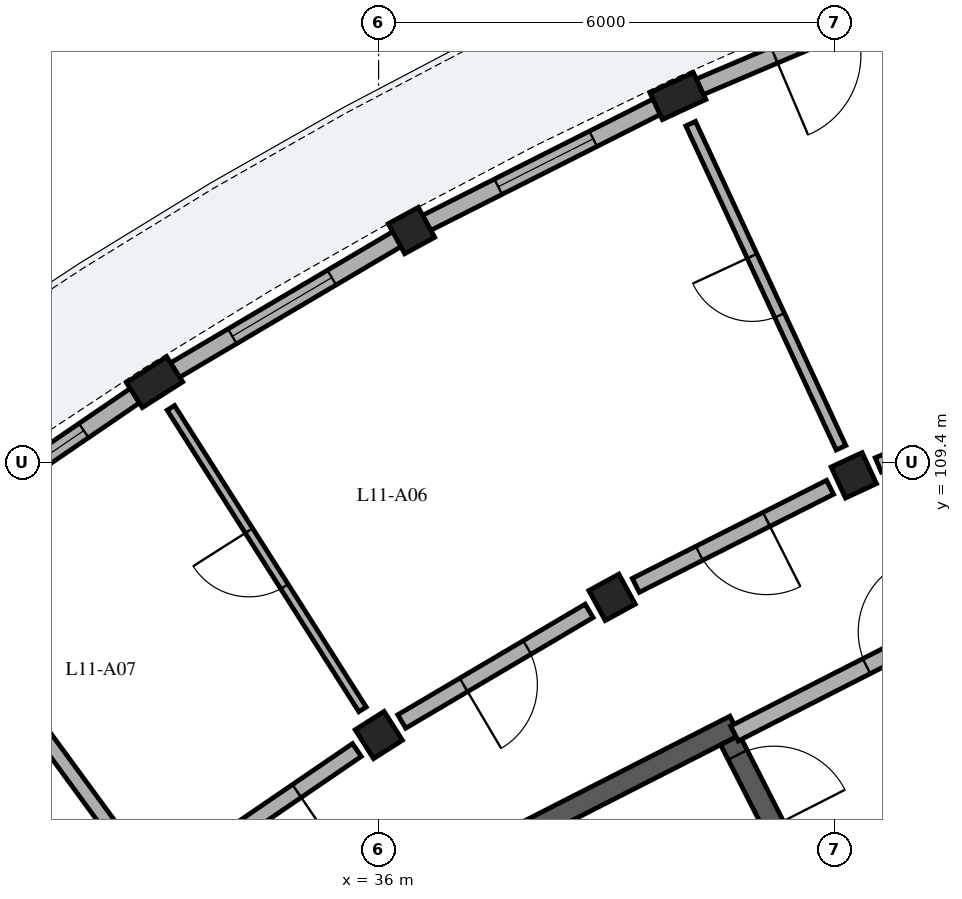
"""IFC4 building model, lengths in metres.
Left out: names, types, materials, properties, quantities, classifications, styles, units other than length and angle.
Written with IfcOpenShell. Run it as: python <this file> out.ifc"""

import sys

from ifc_helpers import new_model, si_unit, direction, frame, frame_2d, origin, origin_2d, place, context, subcontext, project, spatial, rectangle, extrude, element, fill, save


model = new_model("IFC4")
c1 = context("Model", 3, precision=1e-05, world=origin(), true_north=direction((0.0, 1.0)))
c2 = subcontext(c1, "Body", "Model", "MODEL_VIEW")
j1 = project(units=[si_unit("LENGTHUNIT", "METRE"), si_unit("PLANEANGLEUNIT", "RADIAN")], contexts=[c1])
p1 = place(None, origin())
s1 = spatial("IfcSite", under=j1, at=p1, CompositionType="ELEMENT")
p2 = place(p1, origin())
s2 = spatial("IfcBuilding", under=s1, at=p2, CompositionType="ELEMENT")
p3 = place(p2, frame((0.0, 0.0, 39.08)))
s3 = spatial("IfcBuildingStorey", under=s2, at=p3, CompositionType="ELEMENT", Elevation=39.08)
p4 = place(p3, frame((37.585, 104.357, 0.0), z_axis=(0.0, 0.0, 1.0), x_axis=(0.891020222667, 0.453963613958, 0.0)))
e1 = element("IfcWall", 1, at=p4, inside=s3, PredefinedType="SHEAR", context=c2, shape_type="SweptSolid", body=[
    extrude(rectangle(XDim=3.48, YDim=0.28, at=frame_2d((1.74, 0.0))), origin(), (0.0, 0.0, 1.0), 3.11),
])
p5 = place(p3, frame((40.625, 105.748, 0.0), z_axis=(0.0, 0.0, 1.0), x_axis=(0.453992276384, -0.891005618941, 0.0)))
e2 = element("IfcWall", 2, at=p5, inside=s3, PredefinedType="SHEAR", context=c2, shape_type="SweptSolid", body=[
    extrude(rectangle(XDim=6.6, YDim=0.28, at=frame_2d((3.3, 0.0))), origin(), (0.0, 0.0, 1.0), 3.11),
])
p6 = place(p5, frame((0.22, 0.0, 0.0)))
e3 = element("IfcOpeningElement", 3, at=p6, cuts=e2, PredefinedType="OPENING", context=c2, shape_type="SweptSolid", body=[
    extrude(rectangle(XDim=1.05, YDim=2.15, at=frame_2d((0.525, 1.075))), frame((0.0, 0.15, 0.0), z_axis=(0.0, -1.0, 0.0), x_axis=(1.0, 0.0, 0.0)), (0.0, 0.0, 1.0), 0.3),
])
p7 = place(p3, frame((42.252, 109.23, 0.0), z_axis=(0.0, 0.0, 1.0), x_axis=(-0.420859924104, 0.907125638643, 0.0)))
e4 = element("IfcColumn", 4, at=p7, inside=s3, PredefinedType="COLUMN", context=c2, shape_type="SweptSolid", body=[
    extrude(rectangle(XDim=0.45, YDim=0.45, at=origin_2d()), origin(), (0.0, 0.0, 1.0), 3.12),
])
p8 = place(p3, frame((39.938, 114.219, 0.0), z_axis=(0.0, 0.0, 1.0), x_axis=(-0.420859924104, 0.907125638643, 0.0)))
e5 = element("IfcColumn", 5, at=p8, inside=s3, PredefinedType="PILASTER", context=c2, shape_type="SweptSolid", body=[
    extrude(rectangle(XDim=0.39, YDim=0.63, at=origin_2d()), origin(), (0.0, 0.0, 1.0), 3.12),
])
for number, where, z_axis, x_axis in (
    (6, (39.072, 107.625, 0.0), (0.0, 0.0, 1.0), (-0.48, 0.877, 0.0)),
    (7, (36.433, 112.451, 0.0), (0.0, 0.0, 1.0), (-0.48, 0.877, 0.0)),
    (8, (36.003, 105.813, 0.0), (0.0, 0.0, 1.0), (-0.536, 0.844, 0.0)),
):
    element("IfcColumn", number, at=place(p3, frame(where, z_axis=z_axis, x_axis=x_axis)), inside=s3, PredefinedType="COLUMN", context=c2, shape_type="SweptSolid", body=[
        extrude(rectangle(XDim=0.45, YDim=0.45, at=origin_2d()), origin(), (0.0, 0.0, 1.0), 3.12),
    ])
p9 = place(p3, frame((33.052, 110.455, 0.0), z_axis=(0.0, 0.0, 1.0), x_axis=(-0.536481603385, 0.843912015099, 0.0)))
e9 = element("IfcColumn", 9, at=p9, inside=s3, PredefinedType="PILASTER", context=c2, shape_type="SweptSolid", body=[
    extrude(rectangle(XDim=0.39, YDim=0.63, at=origin_2d()), origin(), (0.0, 0.0, 1.0), 3.12),
])
p10 = place(p3, frame((43.372, 115.677, 0.0), z_axis=(0.0, 0.0, 1.0), x_axis=(-0.920495973723, -0.390752047161, 0.0)))
e10 = element("IfcWall", 10, at=p10, inside=s3, PredefinedType="SOLIDWALL", context=c2, shape_type="SweptSolid", body=[
    extrude(rectangle(XDim=3.566, YDim=0.225, at=frame_2d((1.783, 0.0))), origin(), (0.0, 0.0, 1.0), 2.355),
])
p11 = place(p10, frame((1.213, 0.0, 0.0)))
e11 = element("IfcOpeningElement", 11, at=p11, cuts=e10, PredefinedType="OPENING", context=c2, shape_type="SweptSolid", body=[
    extrude(rectangle(XDim=1.14, YDim=2.16, at=frame_2d((0.57, 1.08))), frame((0.0, 0.123, 0.0), z_axis=(0.0, -1.0, 0.0), x_axis=(1.0, 0.0, 0.0)), (0.0, 0.0, 1.0), 0.245),
])
p12 = place(p3, frame((39.791, 114.145, 0.0), z_axis=(0.0, 0.0, 1.0), x_axis=(-0.892764108044, -0.450524413753, 0.0)))
e12 = element("IfcWall", 12, at=p12, inside=s3, PredefinedType="SOLIDWALL", context=c2, shape_type="SweptSolid", body=[
    extrude(rectangle(XDim=3.566, YDim=0.225, at=frame_2d((1.783, 0.0))), origin(), (0.0, 0.0, 1.0), 2.355),
])
p13 = place(p12, frame((1.083, 0.0, 0.55)))
e13 = element("IfcOpeningElement", 13, at=p13, cuts=e12, PredefinedType="OPENING", context=c2, shape_type="SweptSolid", body=[
    extrude(rectangle(XDim=1.4, YDim=1.635, at=frame_2d((0.7, 0.817))), frame((0.0, 0.123, 0.0), z_axis=(0.0, -1.0, 0.0), x_axis=(1.0, 0.0, 0.0)), (0.0, 0.0, 1.0), 0.245),
])
p14 = place(p3, frame((36.265, 112.352, 0.0), z_axis=(0.0, 0.0, 1.0), x_axis=(-0.861132283606, -0.508380949811, 0.0)))
e14 = element("IfcWall", 14, at=p14, inside=s3, PredefinedType="SOLIDWALL", context=c2, shape_type="SweptSolid", body=[
    extrude(rectangle(XDim=3.566, YDim=0.225, at=frame_2d((1.783, 0.0))), origin(), (0.0, 0.0, 1.0), 2.355),
])
p15 = place(p14, frame((1.023, 0.0, 0.55)))
e15 = element("IfcOpeningElement", 15, at=p15, cuts=e14, PredefinedType="OPENING", context=c2, shape_type="SweptSolid", body=[
    extrude(rectangle(XDim=1.52, YDim=1.485, at=frame_2d((0.76, 0.743))), frame((0.0, 0.123, 0.0), z_axis=(0.0, -1.0, 0.0), x_axis=(1.0, 0.0, 0.0)), (0.0, 0.0, 1.0), 0.245),
])
p16 = place(p3, frame((32.916, 110.362, 0.0), z_axis=(0.0, 0.0, 1.0), x_axis=(-0.825772203118, -0.564003784169, 0.0)))
e16 = element("IfcWall", 16, at=p16, inside=s3, PredefinedType="SOLIDWALL", context=c2, shape_type="SweptSolid", body=[
    extrude(rectangle(XDim=3.566, YDim=0.225, at=frame_2d((1.783, 0.0))), origin(), (0.0, 0.0, 1.0), 2.355),
])
p17 = place(p16, frame((0.963, 0.0, 0.55)))
e17 = element("IfcOpeningElement", 17, at=p17, cuts=e16, PredefinedType="OPENING", context=c2, shape_type="SweptSolid", body=[
    extrude(rectangle(XDim=1.64, YDim=1.56, at=frame_2d((0.82, 0.78))), frame((0.0, 0.123, 0.0), z_axis=(0.0, -1.0, 0.0), x_axis=(1.0, 0.0, 0.0)), (0.0, 0.0, 1.0), 0.245),
])
p18 = place(p3, frame((40.682, 105.834, 0.0), z_axis=(0.0, 0.0, 1.0), x_axis=(0.891003372311, 0.453996685595, 0.0)))
e18 = element("IfcWall", 18, at=p18, inside=s3, PredefinedType="PARTITIONING", context=c2, shape_type="SweptSolid", body=[
    extrude(rectangle(XDim=4.9, YDim=0.22, at=frame_2d((2.45, 0.0))), origin(), (0.0, 0.0, 1.0), 2.34),
])
p19 = place(p18, frame((1.95, 0.0, 0.0)))
e19 = element("IfcOpeningElement", 19, at=p19, cuts=e18, PredefinedType="OPENING", context=c2, shape_type="SweptSolid", body=[
    extrude(rectangle(XDim=1.0, YDim=2.15, at=frame_2d((0.5, 1.075))), frame((0.0, 0.12, 0.0), z_axis=(0.0, -1.0, 0.0), x_axis=(1.0, 0.0, 0.0)), (0.0, 0.0, 1.0), 0.24),
])
p20 = place(p3, frame((45.21, 110.486, 0.0), z_axis=(0.0, 0.0, 1.0), x_axis=(-0.920511160294, -0.390716270168, 0.0)))
e20 = element("IfcWall", 20, at=p20, inside=s3, PredefinedType="PARTITIONING", context=c2, shape_type="SweptSolid", body=[
    extrude(rectangle(XDim=2.863, YDim=0.205, at=frame_2d((1.432, 0.0))), origin(), (0.0, 0.0, 1.0), 2.37),
])
p21 = place(p20, frame((0.967, 0.0, 0.0)))
e21 = element("IfcOpeningElement", 21, at=p21, cuts=e20, PredefinedType="OPENING", context=c2, shape_type="SweptSolid", body=[
    extrude(rectangle(XDim=0.93, YDim=2.12, at=frame_2d((0.465, 1.06))), frame((0.0, 0.113, 0.0), z_axis=(0.0, -1.0, 0.0), x_axis=(1.0, 0.0, 0.0)), (0.0, 0.0, 1.0), 0.225),
])
p22 = place(p3, frame((42.084, 109.593, 0.0), z_axis=(0.0, 0.0, 1.0), x_axis=(-0.420862519045, 0.907124434718, 0.0)))
e22 = element("IfcWall", 22, at=p22, inside=s3, PredefinedType="PLUMBINGWALL", context=c2, shape_type="SweptSolid", body=[
    extrude(rectangle(XDim=4.7, YDim=0.14, at=frame_2d((2.35, 0.0))), origin(), (0.0, 0.0, 1.0), 2.37),
])
p23 = place(p22, frame((1.92, 0.0, 0.0)))
e23 = element("IfcOpeningElement", 23, at=p23, cuts=e22, PredefinedType="OPENING", context=c2, shape_type="SweptSolid", body=[
    extrude(rectangle(XDim=0.86, YDim=2.06, at=frame_2d((0.43, 1.03))), frame((0.0, 0.08, 0.0), z_axis=(0.0, -1.0, 0.0), x_axis=(1.0, 0.0, 0.0)), (0.0, 0.0, 1.0), 0.16),
])
p24 = place(p3, frame((41.94, 109.073, 0.0), z_axis=(0.0, 0.0, 1.0), x_axis=(-0.89273239336, -0.450587254419, 0.0)))
e24 = element("IfcWall", 24, at=p24, inside=s3, PredefinedType="PARTITIONING", context=c2, shape_type="SweptSolid", body=[
    extrude(rectangle(XDim=2.863, YDim=0.205, at=frame_2d((1.432, 0.0))), origin(), (0.0, 0.0, 1.0), 2.37),
])
p25 = place(p24, frame((0.937, 0.0, 0.0)))
e25 = element("IfcOpeningElement", 25, at=p25, cuts=e24, PredefinedType="OPENING", context=c2, shape_type="SweptSolid", body=[
    extrude(rectangle(XDim=0.99, YDim=2.16, at=frame_2d((0.495, 1.08))), frame((0.0, 0.113, 0.0), z_axis=(0.0, -1.0, 0.0), x_axis=(1.0, 0.0, 0.0)), (0.0, 0.0, 1.0), 0.225),
])
p26 = place(p3, frame((38.77, 107.447, 0.0), z_axis=(0.0, 0.0, 1.0), x_axis=(-0.861113214678, -0.508413248753, 0.0)))
e26 = element("IfcWall", 26, at=p26, inside=s3, PredefinedType="PARTITIONING", context=c2, shape_type="SweptSolid", body=[
    extrude(rectangle(XDim=2.863, YDim=0.205, at=frame_2d((1.432, 0.0))), origin(), (0.0, 0.0, 1.0), 2.37),
])
p27 = place(p26, frame((0.947, 0.0, 0.0)))
e27 = element("IfcOpeningElement", 27, at=p27, cuts=e26, PredefinedType="OPENING", context=c2, shape_type="SweptSolid", body=[
    extrude(rectangle(XDim=0.97, YDim=2.15, at=frame_2d((0.485, 1.075))), frame((0.0, 0.113, 0.0), z_axis=(0.0, -1.0, 0.0), x_axis=(1.0, 0.0, 0.0)), (0.0, 0.0, 1.0), 0.225),
])
p28 = place(p3, frame((35.789, 106.151, 0.0), z_axis=(0.0, 0.0, 1.0), x_axis=(-0.536492262982, 0.843905238614, 0.0)))
e28 = element("IfcWall", 28, at=p28, inside=s3, PredefinedType="PARTITIONING", context=c2, shape_type="SweptSolid", body=[
    extrude(rectangle(XDim=4.7, YDim=0.115, at=frame_2d((2.35, 0.0))), origin(), (0.0, 0.0, 1.0), 2.37),
])
p29 = place(p28, frame((1.915, 0.0, 0.0)))
e29 = element("IfcOpeningElement", 29, at=p29, cuts=e28, PredefinedType="OPENING", context=c2, shape_type="SweptSolid", body=[
    extrude(rectangle(XDim=0.87, YDim=2.08, at=frame_2d((0.435, 1.04))), frame((0.0, 0.067, 0.0), z_axis=(0.0, -1.0, 0.0), x_axis=(1.0, 0.0, 0.0)), (0.0, 0.0, 1.0), 0.135),
])
p30 = place(p3, frame((35.714, 105.616, 0.0), z_axis=(0.0, 0.0, 1.0), x_axis=(-0.825779671787, -0.563992848947, 0.0)))
e30 = element("IfcWall", 30, at=p30, inside=s3, PredefinedType="PARTITIONING", context=c2, shape_type="SweptSolid", body=[
    extrude(rectangle(XDim=2.863, YDim=0.205, at=frame_2d((1.432, 0.0))), origin(), (0.0, 0.0, 1.0), 2.37),
])
p31 = place(p30, frame((0.957, 0.0, 0.0)))
e31 = element("IfcOpeningElement", 31, at=p31, cuts=e30, PredefinedType="OPENING", context=c2, shape_type="SweptSolid", body=[
    extrude(rectangle(XDim=0.95, YDim=2.13, at=frame_2d((0.475, 1.065))), frame((0.0, 0.113, 0.0), z_axis=(0.0, -1.0, 0.0), x_axis=(1.0, 0.0, 0.0)), (0.0, 0.0, 1.0), 0.225),
])
p32 = place(p3, frame((32.824, 104.126, 0.0), z_axis=(0.0, 0.0, 1.0), x_axis=(-0.590910940129, 0.806736797745, 0.0)))
e32 = element("IfcWall", 32, at=p32, inside=s3, PredefinedType="PARTITIONING", context=c2, shape_type="SweptSolid", body=[
    extrude(rectangle(XDim=4.7, YDim=0.185, at=frame_2d((2.35, 0.0))), origin(), (0.0, 0.0, 1.0), 2.37),
])
p33 = place(p11, origin())
e33 = element("IfcDoor", 33, at=p33, inside=s3, OperationType="SINGLE_SWING_RIGHT", PredefinedType="DOOR", context=c2, shape_type="SweptSolid", body=[
    extrude(rectangle(XDim=1.14, YDim=2.16, at=frame_2d((0.57, 1.08))), frame((0.0, 0.025, 0.0), z_axis=(0.0, -1.0, 0.0), x_axis=(1.0, 0.0, 0.0)), (0.0, 0.0, 1.0), 0.05),
])
fill(e11, e33)
p34 = place(p13, origin())
e34 = element("IfcWindow", 34, at=p34, inside=s3, PartitioningType="SINGLE_PANEL", PredefinedType="WINDOW", context=c2, shape_type="SweptSolid", body=[
    extrude(rectangle(XDim=1.4, YDim=1.635, at=frame_2d((0.7, 0.817))), frame((0.0, 0.03, 0.0), z_axis=(0.0, -1.0, 0.0), x_axis=(1.0, 0.0, 0.0)), (0.0, 0.0, 1.0), 0.06),
])
fill(e13, e34)
p35 = place(p15, origin())
e35 = element("IfcWindow", 35, at=p35, inside=s3, PartitioningType="SINGLE_PANEL", PredefinedType="WINDOW", context=c2, shape_type="SweptSolid", body=[
    extrude(rectangle(XDim=1.52, YDim=1.485, at=frame_2d((0.76, 0.743))), frame((0.0, 0.03, 0.0), z_axis=(0.0, -1.0, 0.0), x_axis=(1.0, 0.0, 0.0)), (0.0, 0.0, 1.0), 0.06),
])
fill(e15, e35)
p36 = place(p17, origin())
e36 = element("IfcWindow", 36, at=p36, inside=s3, PartitioningType="SINGLE_PANEL", PredefinedType="WINDOW", context=c2, shape_type="SweptSolid", body=[
    extrude(rectangle(XDim=1.64, YDim=1.56, at=frame_2d((0.82, 0.78))), frame((0.0, 0.03, 0.0), z_axis=(0.0, -1.0, 0.0), x_axis=(1.0, 0.0, 0.0)), (0.0, 0.0, 1.0), 0.06),
])
fill(e17, e36)
p37 = place(p6, origin())
e37 = element("IfcDoor", 37, at=p37, inside=s3, OperationType="SINGLE_SWING_RIGHT", PredefinedType="DOOR", context=c2, shape_type="SweptSolid", body=[
    extrude(rectangle(XDim=1.05, YDim=2.15, at=frame_2d((0.525, 1.075))), frame((0.0, 0.025, 0.0), z_axis=(0.0, -1.0, 0.0), x_axis=(1.0, 0.0, 0.0)), (0.0, 0.0, 1.0), 0.05),
])
fill(e3, e37)
p38 = place(p19, origin())
e38 = element("IfcDoor", 38, at=p38, inside=s3, OperationType="SINGLE_SWING_RIGHT", PredefinedType="DOOR", context=c2, shape_type="SweptSolid", body=[
    extrude(rectangle(XDim=1.0, YDim=2.15, at=frame_2d((0.5, 1.075))), frame((0.0, 0.025, 0.0), z_axis=(0.0, -1.0, 0.0), x_axis=(1.0, 0.0, 0.0)), (0.0, 0.0, 1.0), 0.05),
])
fill(e19, e38)
p39 = place(p23, origin())
e39 = element("IfcDoor", 39, at=p39, inside=s3, OperationType="SINGLE_SWING_RIGHT", PredefinedType="DOOR", context=c2, shape_type="SweptSolid", body=[
    extrude(rectangle(XDim=0.86, YDim=2.06, at=frame_2d((0.43, 1.03))), frame((0.0, 0.025, 0.0), z_axis=(0.0, -1.0, 0.0), x_axis=(1.0, 0.0, 0.0)), (0.0, 0.0, 1.0), 0.05),
])
fill(e23, e39)
p40 = place(p25, origin())
e40 = element("IfcDoor", 40, at=p40, inside=s3, OperationType="SINGLE_SWING_LEFT", PredefinedType="DOOR", context=c2, shape_type="SweptSolid", body=[
    extrude(rectangle(XDim=0.99, YDim=2.16, at=frame_2d((0.495, 1.08))), frame((0.0, 0.025, 0.0), z_axis=(0.0, -1.0, 0.0), x_axis=(1.0, 0.0, 0.0)), (0.0, 0.0, 1.0), 0.05),
])
fill(e25, e40)
p41 = place(p27, origin())
e41 = element("IfcDoor", 41, at=p41, inside=s3, OperationType="SINGLE_SWING_RIGHT", PredefinedType="DOOR", context=c2, shape_type="SweptSolid", body=[
    extrude(rectangle(XDim=0.97, YDim=2.15, at=frame_2d((0.485, 1.075))), frame((0.0, 0.025, 0.0), z_axis=(0.0, -1.0, 0.0), x_axis=(1.0, 0.0, 0.0)), (0.0, 0.0, 1.0), 0.05),
])
fill(e27, e41)
p42 = place(p29, origin())
e42 = element("IfcDoor", 42, at=p42, inside=s3, OperationType="SINGLE_SWING_RIGHT", PredefinedType="DOOR", context=c2, shape_type="SweptSolid", body=[
    extrude(rectangle(XDim=0.87, YDim=2.08, at=frame_2d((0.435, 1.04))), frame((0.0, 0.025, 0.0), z_axis=(0.0, -1.0, 0.0), x_axis=(1.0, 0.0, 0.0)), (0.0, 0.0, 1.0), 0.05),
])
fill(e29, e42)
p43 = place(p31, origin())
e43 = element("IfcDoor", 43, at=p43, inside=s3, OperationType="SINGLE_SWING_LEFT", PredefinedType="DOOR", context=c2, shape_type="SweptSolid", body=[
    extrude(rectangle(XDim=0.95, YDim=2.13, at=frame_2d((0.475, 1.065))), frame((0.0, 0.025, 0.0), z_axis=(0.0, -1.0, 0.0), x_axis=(1.0, 0.0, 0.0)), (0.0, 0.0, 1.0), 0.05),
])
fill(e31, e43)
save(model, sys.argv[1])
